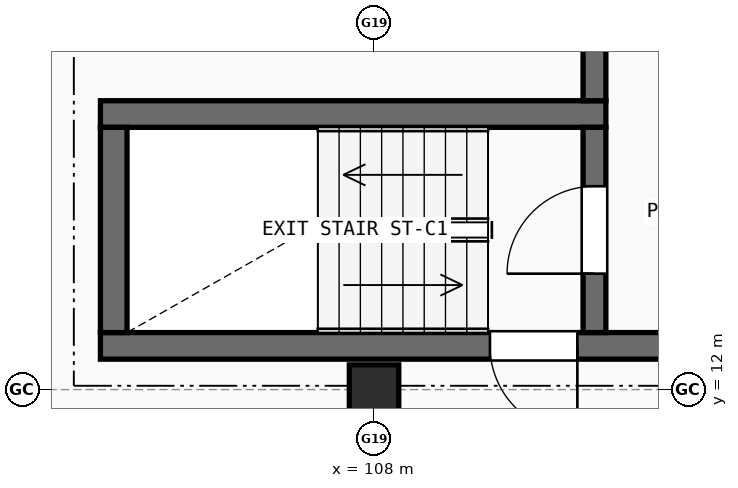
"""IFC4 building model, lengths in metres.
Left out: names, types, materials, properties, quantities, classifications, styles, units other than length and angle.
Written with IfcOpenShell. Run it as: python <this file> out.ifc"""

import sys

from ifc_helpers import new_model, si_unit, direction, frame, frame_2d, origin, origin_2d, place, context, subcontext, project, spatial, rectangle, extrude, element, fill, save


model = new_model("IFC4")
c1 = context("Model", 3, precision=1e-05, world=origin(), true_north=direction((0.0, 1.0)))
c2 = subcontext(c1, "Body", "Model", "MODEL_VIEW")
j1 = project(units=[si_unit("LENGTHUNIT", "METRE"), si_unit("PLANEANGLEUNIT", "RADIAN")], contexts=[c1])
p1 = place(None, origin())
s1 = spatial("IfcSite", under=j1, at=p1, CompositionType="ELEMENT")
p2 = place(p1, origin())
s2 = spatial("IfcBuilding", under=s1, at=p2, CompositionType="ELEMENT")
p3 = place(p2, frame((0.0, 0.0, 7.7)))
s3 = spatial("IfcBuildingStorey", under=s2, at=p3, CompositionType="ELEMENT", Elevation=7.7)
p4 = place(p3, frame((108.0, 12.0, 0.0), z_axis=(0.0, 0.0, 1.0), x_axis=(1.0, 0.0, 0.0)))
e1 = element("IfcColumn", 1, at=p4, inside=s3, PredefinedType="COLUMN", context=c2, shape_type="SweptSolid", body=[
    extrude(rectangle(XDim=0.65, YDim=0.65, at=origin_2d()), origin(), (0.0, 0.0, 1.0), 2.955),
])
p5 = place(p3, frame((104.4, 12.575, 0.0), z_axis=(0.0, 0.0, 1.0), x_axis=(1.0, 0.0, 0.0)))
e2 = element("IfcWall", 2, at=p5, inside=s3, PredefinedType="SHEAR", context=c2, shape_type="SweptSolid", body=[
    extrude(rectangle(XDim=11.4, YDim=0.35, at=frame_2d((5.7, 0.0))), origin(), (0.0, 0.0, 1.0), 2.955),
])
p6 = place(p5, frame((5.125, 0.0, 0.0)))
e3 = element("IfcOpeningElement", 3, at=p6, cuts=e2, PredefinedType="OPENING", context=c2, shape_type="SweptSolid", body=[
    extrude(rectangle(XDim=1.15, YDim=2.15, at=frame_2d((0.575, 1.075))), frame((0.0, 0.185, 0.0), z_axis=(0.0, -1.0, 0.0), x_axis=(1.0, 0.0, 0.0)), (0.0, 0.0, 1.0), 0.37),
])
p7 = place(p3, frame((111.05, 15.625, 0.0), z_axis=(0.0, 0.0, 1.0), x_axis=(-1.0, 0.0, 0.0)))
e4 = element("IfcWall", 4, at=p7, inside=s3, PredefinedType="SHEAR", context=c2, shape_type="SweptSolid", body=[
    extrude(rectangle(XDim=6.65, YDim=0.35, at=frame_2d((3.325, 0.0))), origin(), (0.0, 0.0, 1.0), 2.955),
])
p8 = place(p3, frame((104.575, 15.45, 0.0), z_axis=(0.0, 0.0, 1.0), x_axis=(0.0, -1.0, 0.0)))
e5 = element("IfcWall", 5, at=p8, inside=s3, PredefinedType="SHEAR", context=c2, shape_type="SweptSolid", body=[
    extrude(rectangle(XDim=2.7, YDim=0.35, at=frame_2d((1.35, 0.0))), origin(), (0.0, 0.0, 1.0), 2.955),
])
p9 = place(p3, frame((110.9, 12.75, 0.0), z_axis=(0.0, 0.0, 1.0), x_axis=(0.0, 1.0, 0.0)))
e6 = element("IfcWall", 6, at=p9, inside=s3, PredefinedType="SHEAR", context=c2, shape_type="SweptSolid", body=[
    extrude(rectangle(XDim=2.7, YDim=0.3, at=frame_2d((1.35, 0.0))), origin(), (0.0, 0.0, 1.0), 2.955),
])
p10 = place(p9, frame((0.775, 0.0, 0.0)))
e7 = element("IfcOpeningElement", 7, at=p10, cuts=e6, PredefinedType="OPENING", context=c2, shape_type="SweptSolid", body=[
    extrude(rectangle(XDim=1.15, YDim=2.15, at=frame_2d((0.575, 1.075))), frame((0.0, 0.16, 0.0), z_axis=(0.0, -1.0, 0.0), x_axis=(1.0, 0.0, 0.0)), (0.0, 0.0, 1.0), 0.32),
])
p11 = place(p3, frame((110.9, 15.8, 0.0), z_axis=(0.0, 0.0, 1.0), x_axis=(0.0, 1.0, 0.0)))
e8 = element("IfcWall", 8, at=p11, inside=s3, PredefinedType="SHEAR", context=c2, shape_type="SweptSolid", body=[
    extrude(rectangle(XDim=3.35, YDim=0.3, at=frame_2d((1.675, 0.0))), origin(), (0.0, 0.0, 1.0), 2.955),
])
p12 = place(p6, origin())
e9 = element("IfcDoor", 9, at=p12, inside=s3, OperationType="SINGLE_SWING_RIGHT", PredefinedType="DOOR", context=c2, shape_type="SweptSolid", body=[
    extrude(rectangle(XDim=1.15, YDim=2.15, at=frame_2d((0.575, 1.075))), frame((0.0, 0.025, 0.0), z_axis=(0.0, -1.0, 0.0), x_axis=(1.0, 0.0, 0.0)), (0.0, 0.0, 1.0), 0.05),
])
fill(e3, e9)
p13 = place(p10, origin())
e10 = element("IfcDoor", 10, at=p13, inside=s3, OperationType="SINGLE_SWING_LEFT", PredefinedType="DOOR", context=c2, shape_type="SweptSolid", body=[
    extrude(rectangle(XDim=1.15, YDim=2.15, at=frame_2d((0.575, 1.075))), frame((0.0, 0.025, 0.0), z_axis=(0.0, -1.0, 0.0), x_axis=(1.0, 0.0, 0.0)), (0.0, 0.0, 1.0), 0.05),
])
fill(e7, e10)
save(model, sys.argv[1])
